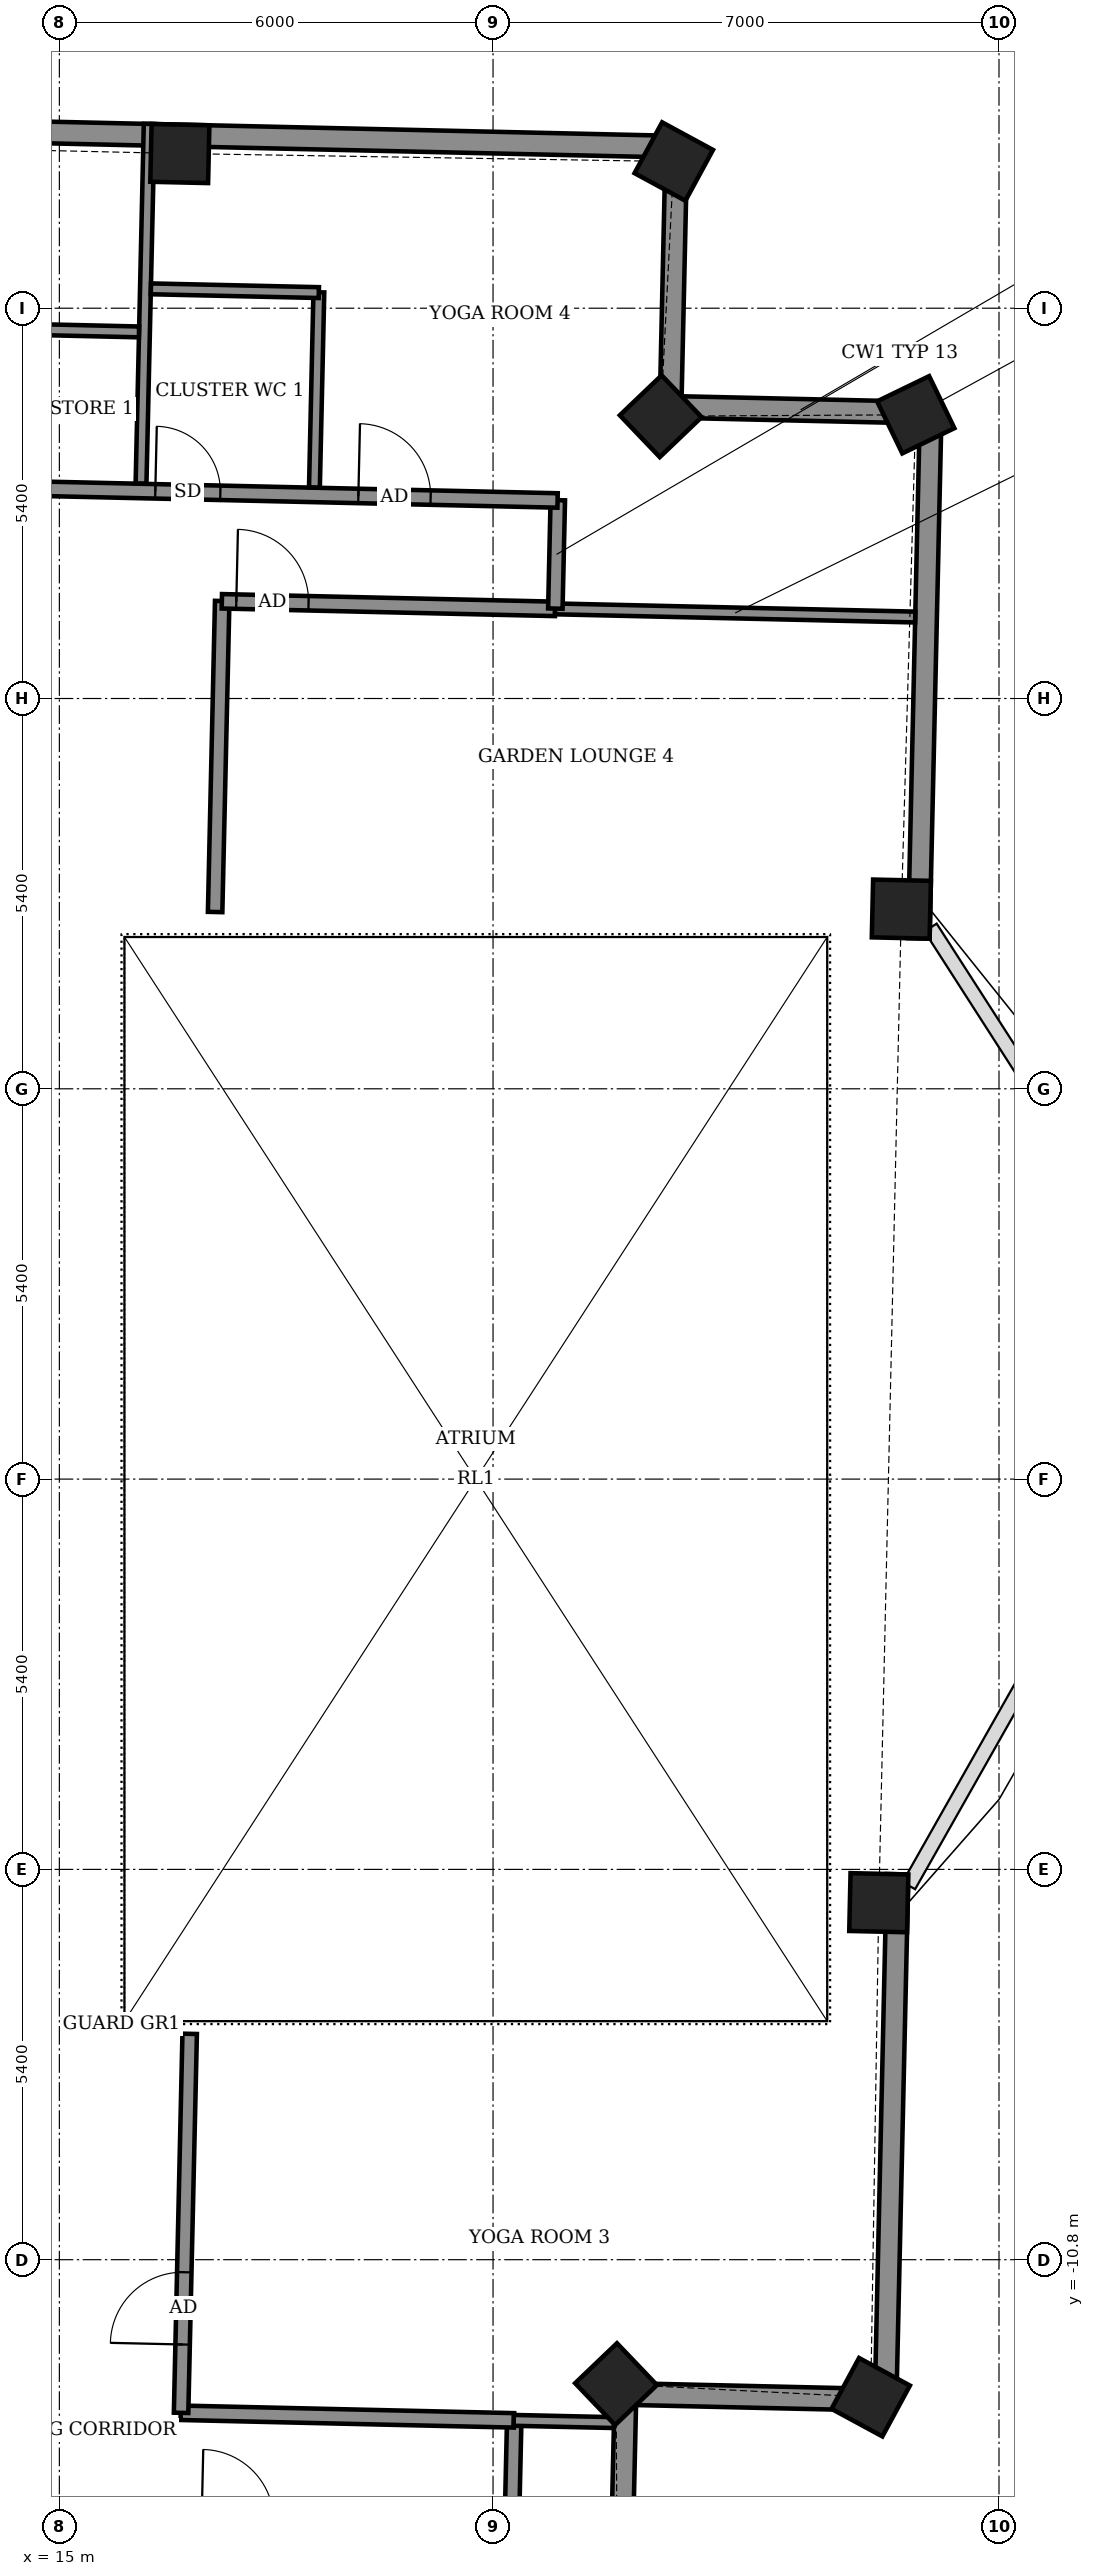
"""IFC4 building model, lengths in metres.
Left out: names, types, materials, properties, quantities, classifications, styles, units other than length and angle.
Written with IfcOpenShell. Run it as: python <this file> out.ifc"""

import sys

from ifc_helpers import new_model, si_unit, direction, frame, frame_2d, origin, origin_2d, place, context, subcontext, project, spatial, rectangle, extrude, element, fill, save


model = new_model("IFC4")
c1 = context("Model", 3, precision=1e-05, world=origin(), true_north=direction((0.0, 1.0)))
c2 = subcontext(c1, "Body", "Model", "MODEL_VIEW")
j1 = project(units=[si_unit("LENGTHUNIT", "METRE"), si_unit("PLANEANGLEUNIT", "RADIAN")], contexts=[c1])
p1 = place(None, origin())
s1 = spatial("IfcSite", under=j1, at=p1, CompositionType="ELEMENT")
p2 = place(p1, origin())
s2 = spatial("IfcBuilding", under=s1, at=p2, CompositionType="ELEMENT")
p3 = place(p2, frame((0.0, 0.0, 350.7)))
s3 = spatial("IfcBuildingStorey", under=s2, at=p3, CompositionType="ELEMENT", Elevation=350.7)
for number, where, z_axis, x_axis in (
    (1, (22.702, -12.522, -0.55), (0.0, 0.0, 1.0), (0.723, 0.691, 0.0)),
    (2, (26.225, -12.702, -0.55), (0.0, 0.0, 1.0), (0.476, 0.879, 0.0)),
    (3, (26.337, -5.861, -0.55), (0.0, 0.0, 1.0), (0.023, 1.0, 0.0)),
    (4, (26.649, 7.886, -0.55), (0.0, 0.0, 1.0), (0.023, 1.0, 0.0)),
    (5, (26.848, 14.726, -0.55), (0.0, 0.0, 1.0), (-0.436, 0.9, 0.0)),
    (6, (23.32, 14.706, -0.55), (0.0, 0.0, 1.0), (-0.691, 0.723, 0.0)),
    (7, (23.5, 18.229, -0.55), (0.0, 0.0, 1.0), (-0.879, 0.477, 0.0)),
    (8, (16.667, 18.34, -0.55), (0.0, 0.0, 1.0), (-1.0, 0.023, 0.0)),
):
    element("IfcColumn", number, at=place(p3, frame(where, z_axis=z_axis, x_axis=x_axis)), inside=s3, PredefinedType="COLUMN", context=c2, shape_type="SweptSolid", body=[
        extrude(rectangle(XDim=0.8, YDim=0.8, at=origin_2d()), origin(), (0.0, 0.0, 1.0), 3.6),
    ])
p4 = place(p3, frame((26.431, -12.74, 0.0), z_axis=(0.0, 0.0, 1.0), x_axis=(0.022686338341, 0.999742631907, 0.0)))
e9 = element("IfcWall", 9, at=p4, inside=s3, PredefinedType="SOLIDWALL", context=c2, shape_type="SweptSolid", body=[
    extrude(rectangle(XDim=7.275, YDim=0.3, at=frame_2d((3.637, 0.0))), origin(), (0.0, 0.0, 1.0), 2.55),
])
p5 = place(p3, frame((26.89, 7.481, 0.0), z_axis=(0.0, 0.0, 1.0), x_axis=(0.02268938335, 0.999742562805, 0.0)))
e10 = element("IfcWall", 10, at=p5, inside=s3, PredefinedType="SOLIDWALL", context=c2, shape_type="SweptSolid", body=[
    extrude(rectangle(XDim=7.274, YDim=0.3, at=frame_2d((3.637, 0.0))), origin(), (0.0, 0.0, 1.0), 2.55),
])
p6 = place(p3, frame((27.055, 14.753, 0.0), z_axis=(0.0, 0.0, 1.0), x_axis=(-0.999740327787, 0.022787650101, 0.0)))
e11 = element("IfcWall", 11, at=p6, inside=s3, PredefinedType="SOLIDWALL", context=c2, shape_type="SweptSolid", body=[
    extrude(rectangle(XDim=3.6, YDim=0.3, at=frame_2d((1.8, 0.0))), origin(), (0.0, 0.0, 1.0), 2.55),
])
p7 = place(p3, frame((23.456, 14.835, 0.0), z_axis=(0.0, 0.0, 1.0), x_axis=(0.022514980321, 0.999746505701, 0.0)))
e12 = element("IfcWall", 12, at=p7, inside=s3, PredefinedType="SOLIDWALL", context=c2, shape_type="SweptSolid", body=[
    extrude(rectangle(XDim=3.6, YDim=0.3, at=frame_2d((1.8, 0.0))), origin(), (0.0, 0.0, 1.0), 2.55),
])
p8 = place(p3, frame((23.537, 18.434, 0.0), z_axis=(0.0, 0.0, 1.0), x_axis=(-0.999742787513, 0.022679480066, 0.0)))
e13 = element("IfcWall", 13, at=p8, inside=s3, PredefinedType="SOLIDWALL", context=c2, shape_type="SweptSolid", body=[
    extrude(rectangle(XDim=41.8, YDim=0.3, at=frame_2d((20.9, 0.0))), origin(), (0.0, 0.0, 1.0), 2.5),
])
p9 = place(p3, frame((22.75, -16.257, 0.0), z_axis=(0.0, 0.0, 1.0), x_axis=(0.02278610514, 0.999740363001, 0.0)))
e14 = element("IfcWall", 14, at=p9, inside=s3, PredefinedType="SOLIDWALL", context=c2, shape_type="SweptSolid", body=[
    extrude(rectangle(XDim=3.6, YDim=0.3, at=frame_2d((1.8, 0.0))), origin(), (0.0, 0.0, 1.0), 2.55),
])
p10 = place(p3, frame((22.832, -12.658, 0.0), z_axis=(0.0, 0.0, 1.0), x_axis=(0.999740327787, -0.022787650101, 0.0)))
e15 = element("IfcWall", 15, at=p10, inside=s3, PredefinedType="SOLIDWALL", context=c2, shape_type="SweptSolid", body=[
    extrude(rectangle(XDim=3.6, YDim=0.3, at=frame_2d((1.8, 0.0))), origin(), (0.0, 0.0, 1.0), 2.55),
])
p11 = place(p3, frame((-17.468, -13.644, 0.0), z_axis=(0.0, 0.0, 1.0), x_axis=(0.999742531431, -0.022690765715, 0.0)))
e16 = element("IfcWall", 16, at=p11, inside=s3, PredefinedType="PARTITIONING", context=c2, shape_type="SweptSolid", body=[
    extrude(rectangle(XDim=38.734, YDim=0.2, at=frame_2d((19.367, 0.0))), origin(), (0.0, 0.0, 1.0), 3.05),
])
p12 = place(p11, frame((1.154, 0.0, 0.0)))
e17 = element("IfcOpeningElement", 17, at=p12, cuts=e16, PredefinedType="OPENING", context=c2, shape_type="SweptSolid", body=[
    extrude(rectangle(XDim=1.0, YDim=2.1, at=frame_2d((0.5, 1.05))), frame((0.0, 0.11, 0.0), z_axis=(0.0, -1.0, 0.0), x_axis=(1.0, 0.0, 0.0)), (0.0, 0.0, 1.0), 0.22),
])
p13 = place(p11, frame((8.367, 0.0, 0.0)))
e18 = element("IfcOpeningElement", 18, at=p13, cuts=e16, PredefinedType="OPENING", context=c2, shape_type="SweptSolid", body=[
    extrude(rectangle(XDim=1.0, YDim=2.1, at=frame_2d((0.5, 1.05))), frame((0.0, 0.11, 0.0), z_axis=(0.0, -1.0, 0.0), x_axis=(1.0, 0.0, 0.0)), (0.0, 0.0, 1.0), 0.22),
])
p14 = place(p11, frame((16.117, 0.0, 0.0)))
e19 = element("IfcOpeningElement", 19, at=p14, cuts=e16, PredefinedType="OPENING", context=c2, shape_type="SweptSolid", body=[
    extrude(rectangle(XDim=1.0, YDim=2.1, at=frame_2d((0.5, 1.05))), frame((0.0, 0.11, 0.0), z_axis=(0.0, -1.0, 0.0), x_axis=(1.0, 0.0, 0.0)), (0.0, 0.0, 1.0), 0.22),
])
p15 = place(p11, frame((21.367, 0.0, 0.0)))
e20 = element("IfcOpeningElement", 20, at=p15, cuts=e16, PredefinedType="OPENING", context=c2, shape_type="SweptSolid", body=[
    extrude(rectangle(XDim=0.9, YDim=2.1, at=frame_2d((0.45, 1.05))), frame((0.0, 0.11, 0.0), z_axis=(0.0, -1.0, 0.0), x_axis=(1.0, 0.0, 0.0)), (0.0, 0.0, 1.0), 0.22),
])
p16 = place(p11, frame((27.403, 0.0, 0.0)))
e21 = element("IfcOpeningElement", 21, at=p16, cuts=e16, PredefinedType="OPENING", context=c2, shape_type="SweptSolid", body=[
    extrude(rectangle(XDim=1.0, YDim=2.1, at=frame_2d((0.5, 1.05))), frame((0.0, 0.11, 0.0), z_axis=(0.0, -1.0, 0.0), x_axis=(1.0, 0.0, 0.0)), (0.0, 0.0, 1.0), 0.22),
])
p17 = place(p11, frame((23.967, 0.0, 0.0)))
e22 = element("IfcOpeningElement", 22, at=p17, cuts=e16, PredefinedType="OPENING", context=c2, shape_type="SweptSolid", body=[
    extrude(rectangle(XDim=0.9, YDim=2.1, at=frame_2d((0.45, 1.05))), frame((0.0, 0.11, 0.0), z_axis=(0.0, -1.0, 0.0), x_axis=(1.0, 0.0, 0.0)), (0.0, 0.0, 1.0), 0.22),
])
p18 = place(p11, frame((34.445, 0.0, 0.0)))
e23 = element("IfcOpeningElement", 23, at=p18, cuts=e16, PredefinedType="OPENING", context=c2, shape_type="SweptSolid", body=[
    extrude(rectangle(XDim=1.0, YDim=2.1, at=frame_2d((0.5, 1.05))), frame((0.0, 0.11, 0.0), z_axis=(0.0, -1.0, 0.0), x_axis=(1.0, 0.0, 0.0)), (0.0, 0.0, 1.0), 0.22),
])
p19 = place(p3, frame((21.259, -14.523, 0.0), z_axis=(0.0, 0.0, 1.0), x_axis=(0.022617910375, 0.999744182344, 0.0)))
e24 = element("IfcWall", 24, at=p19, inside=s3, PredefinedType="PARTITIONING", context=c2, shape_type="SweptSolid", body=[
    extrude(rectangle(XDim=1.5, YDim=0.2, at=frame_2d((0.75, 0.0))), origin(), (0.0, 0.0, 1.0), 3.05),
])
p20 = place(p3, frame((16.679, -12.918, 0.0), z_axis=(0.0, 0.0, 1.0), x_axis=(0.99974093296, -0.022761084406, 0.0)))
e25 = element("IfcWall", 25, at=p20, inside=s3, PredefinedType="PARTITIONING", context=c2, shape_type="SweptSolid", body=[
    extrude(rectangle(XDim=4.612, YDim=0.2, at=frame_2d((2.306, 0.0))), origin(), (0.0, 0.0, 1.0), 3.05),
])
p21 = place(p3, frame((16.684, -12.919, 0.0), z_axis=(0.0, 0.0, 1.0), x_axis=(0.022667483124, 0.999743059595, 0.0)))
e26 = element("IfcWall", 26, at=p21, inside=s3, PredefinedType="PARTITIONING", context=c2, shape_type="SweptSolid", body=[
    extrude(rectangle(XDim=5.245, YDim=0.2, at=frame_2d((2.623, 0.0))), origin(), (0.0, 0.0, 1.0), 3.05),
])
p22 = place(p21, frame((0.946, 0.0, 0.0)))
e27 = element("IfcOpeningElement", 27, at=p22, cuts=e26, PredefinedType="OPENING", context=c2, shape_type="SweptSolid", body=[
    extrude(rectangle(XDim=1.0, YDim=2.1, at=frame_2d((0.5, 1.05))), frame((0.0, 0.11, 0.0), z_axis=(0.0, -1.0, 0.0), x_axis=(1.0, 0.0, 0.0)), (0.0, 0.0, 1.0), 0.22),
])
p23 = place(p3, frame((21.286, -13.023, 0.0), z_axis=(0.0, 0.0, 1.0), x_axis=(0.999750303588, -0.022345703723, 0.0)))
e28 = element("IfcWall", 28, at=p23, inside=s3, PredefinedType="PARTITIONING", context=c2, shape_type="SweptSolid", body=[
    extrude(rectangle(XDim=1.387, YDim=0.15, at=frame_2d((0.694, 0.0))), origin(), (0.0, 0.0, 1.0), 2.55),
])
p24 = place(p3, frame((17.155, 7.846, 0.0), z_axis=(0.0, 0.0, 1.0), x_axis=(0.022745886685, 0.999741278851, 0.0)))
e29 = element("IfcWall", 29, at=p24, inside=s3, PredefinedType="PARTITIONING", context=c2, shape_type="SweptSolid", body=[
    extrude(rectangle(XDim=4.304, YDim=0.2, at=frame_2d((2.152, 0.0))), origin(), (0.0, 0.0, 1.0), 3.05),
])
p25 = place(p3, frame((17.248, 12.145, 0.0), z_axis=(0.0, 0.0, 1.0), x_axis=(0.999740905536, -0.022762288964, 0.0)))
e30 = element("IfcWall", 30, at=p25, inside=s3, PredefinedType="PARTITIONING", context=c2, shape_type="SweptSolid", body=[
    extrude(rectangle(XDim=4.612, YDim=0.2, at=frame_2d((2.306, 0.0))), origin(), (0.0, 0.0, 1.0), 3.05),
])
p26 = place(p25, frame((0.2, 0.0, 0.0)))
e31 = element("IfcOpeningElement", 31, at=p26, cuts=e30, PredefinedType="OPENING", context=c2, shape_type="SweptSolid", body=[
    extrude(rectangle(XDim=1.0, YDim=2.1, at=frame_2d((0.5, 1.05))), frame((0.0, 0.11, 0.0), z_axis=(0.0, -1.0, 0.0), x_axis=(1.0, 0.0, 0.0)), (0.0, 0.0, 1.0), 0.22),
])
p27 = place(p3, frame((21.859, 12.04, 0.0), z_axis=(0.0, 0.0, 1.0), x_axis=(0.999742719999, -0.022682455989, 0.0)))
e32 = element("IfcWall", 32, at=p27, inside=s3, PredefinedType="PARTITIONING", context=c2, shape_type="SweptSolid", body=[
    extrude(rectangle(XDim=4.983, YDim=0.15, at=frame_2d((2.492, 0.0))), origin(), (0.0, 0.0, 1.0), 2.55),
])
p28 = place(p3, frame((21.862, 12.044, 0.0), z_axis=(0.0, 0.0, 1.0), x_axis=(0.022617910375, 0.999744182344, 0.0)))
e33 = element("IfcWall", 33, at=p28, inside=s3, PredefinedType="PARTITIONING", context=c2, shape_type="SweptSolid", body=[
    extrude(rectangle(XDim=1.5, YDim=0.2, at=frame_2d((0.75, 0.0))), origin(), (0.0, 0.0, 1.0), 3.05),
])
p29 = place(p3, frame((-16.831, 14.419, 0.0), z_axis=(0.0, 0.0, 1.0), x_axis=(0.999742531431, -0.022690765715, 0.0)))
e34 = element("IfcWall", 34, at=p29, inside=s3, PredefinedType="PARTITIONING", context=c2, shape_type="SweptSolid", body=[
    extrude(rectangle(XDim=38.734, YDim=0.2, at=frame_2d((19.367, 0.0))), origin(), (0.0, 0.0, 1.0), 3.05),
])
p30 = place(p29, frame((35.977, 0.0, 0.0)))
e35 = element("IfcOpeningElement", 35, at=p30, cuts=e34, PredefinedType="OPENING", context=c2, shape_type="SweptSolid", body=[
    extrude(rectangle(XDim=1.0, YDim=2.1, at=frame_2d((0.5, 1.05))), frame((0.0, 0.11, 0.0), z_axis=(0.0, -1.0, 0.0), x_axis=(1.0, 0.0, 0.0)), (0.0, 0.0, 1.0), 0.22),
])
p31 = place(p29, frame((33.167, 0.0, 0.0)))
e36 = element("IfcOpeningElement", 36, at=p31, cuts=e34, PredefinedType="OPENING", context=c2, shape_type="SweptSolid", body=[
    extrude(rectangle(XDim=0.9, YDim=2.1, at=frame_2d((0.45, 1.05))), frame((0.0, 0.11, 0.0), z_axis=(0.0, -1.0, 0.0), x_axis=(1.0, 0.0, 0.0)), (0.0, 0.0, 1.0), 0.22),
])
p32 = place(p29, frame((28.467, 0.0, 0.0)))
e37 = element("IfcOpeningElement", 37, at=p32, cuts=e34, PredefinedType="OPENING", context=c2, shape_type="SweptSolid", body=[
    extrude(rectangle(XDim=1.0, YDim=2.1, at=frame_2d((0.5, 1.05))), frame((0.0, 0.11, 0.0), z_axis=(0.0, -1.0, 0.0), x_axis=(1.0, 0.0, 0.0)), (0.0, 0.0, 1.0), 0.22),
])
p33 = place(p29, frame((30.767, 0.0, 0.0)))
e38 = element("IfcOpeningElement", 38, at=p33, cuts=e34, PredefinedType="OPENING", context=c2, shape_type="SweptSolid", body=[
    extrude(rectangle(XDim=0.9, YDim=2.1, at=frame_2d((0.45, 1.05))), frame((0.0, 0.11, 0.0), z_axis=(0.0, -1.0, 0.0), x_axis=(1.0, 0.0, 0.0)), (0.0, 0.0, 1.0), 0.22),
])
p34 = place(p29, frame((23.541, 0.0, 0.0)))
e39 = element("IfcOpeningElement", 39, at=p34, cuts=e34, PredefinedType="OPENING", context=c2, shape_type="SweptSolid", body=[
    extrude(rectangle(XDim=1.0, YDim=2.1, at=frame_2d((0.5, 1.05))), frame((0.0, 0.11, 0.0), z_axis=(0.0, -1.0, 0.0), x_axis=(1.0, 0.0, 0.0)), (0.0, 0.0, 1.0), 0.22),
])
p35 = place(p29, frame((15.828, 0.0, 0.0)))
e40 = element("IfcOpeningElement", 40, at=p35, cuts=e34, PredefinedType="OPENING", context=c2, shape_type="SweptSolid", body=[
    extrude(rectangle(XDim=1.0, YDim=2.1, at=frame_2d((0.5, 1.05))), frame((0.0, 0.11, 0.0), z_axis=(0.0, -1.0, 0.0), x_axis=(1.0, 0.0, 0.0)), (0.0, 0.0, 1.0), 0.22),
])
p36 = place(p29, frame((19.967, 0.0, 0.0)))
e41 = element("IfcOpeningElement", 41, at=p36, cuts=e34, PredefinedType="OPENING", context=c2, shape_type="SweptSolid", body=[
    extrude(rectangle(XDim=0.9, YDim=2.1, at=frame_2d((0.45, 1.05))), frame((0.0, 0.11, 0.0), z_axis=(0.0, -1.0, 0.0), x_axis=(1.0, 0.0, 0.0)), (0.0, 0.0, 1.0), 0.22),
])
p37 = place(p29, frame((9.83, 0.0, 0.0)))
e42 = element("IfcOpeningElement", 42, at=p37, cuts=e34, PredefinedType="OPENING", context=c2, shape_type="SweptSolid", body=[
    extrude(rectangle(XDim=1.0, YDim=2.1, at=frame_2d((0.5, 1.05))), frame((0.0, 0.11, 0.0), z_axis=(0.0, -1.0, 0.0), x_axis=(1.0, 0.0, 0.0)), (0.0, 0.0, 1.0), 0.22),
])
p38 = place(p29, frame((6.817, 0.0, 0.0)))
e43 = element("IfcOpeningElement", 43, at=p38, cuts=e34, PredefinedType="OPENING", context=c2, shape_type="SweptSolid", body=[
    extrude(rectangle(XDim=0.9, YDim=2.1, at=frame_2d((0.45, 1.05))), frame((0.0, 0.11, 0.0), z_axis=(0.0, -1.0, 0.0), x_axis=(1.0, 0.0, 0.0)), (0.0, 0.0, 1.0), 0.22),
])
p39 = place(p29, frame((0.2, 0.0, 0.0)))
e44 = element("IfcOpeningElement", 44, at=p39, cuts=e34, PredefinedType="OPENING", context=c2, shape_type="SweptSolid", body=[
    extrude(rectangle(XDim=1.0, YDim=2.1, at=frame_2d((0.5, 1.05))), frame((0.0, 0.11, 0.0), z_axis=(0.0, -1.0, 0.0), x_axis=(1.0, 0.0, 0.0)), (0.0, 0.0, 1.0), 0.22),
])
p40 = place(p29, frame((4.217, 0.0, 0.0)))
e45 = element("IfcOpeningElement", 45, at=p40, cuts=e34, PredefinedType="OPENING", context=c2, shape_type="SweptSolid", body=[
    extrude(rectangle(XDim=0.9, YDim=2.1, at=frame_2d((0.45, 1.05))), frame((0.0, 0.11, 0.0), z_axis=(0.0, -1.0, 0.0), x_axis=(1.0, 0.0, 0.0)), (0.0, 0.0, 1.0), 0.22),
])
p41 = place(p3, frame((16.13, 13.775, 0.0), z_axis=(0.0, 0.0, 1.0), x_axis=(0.022714718825, 0.999741987489, 0.0)))
e46 = element("IfcWall", 46, at=p41, inside=s3, PredefinedType="PARTITIONING", context=c2, shape_type="SweptSolid", body=[
    extrude(rectangle(XDim=4.976, YDim=0.15, at=frame_2d((2.488, 0.0))), origin(), (0.0, 0.0, 1.0), 2.5),
])
p42 = place(p3, frame((18.529, 13.72, 0.0), z_axis=(0.0, 0.0, 1.0), x_axis=(0.022600248254, 0.99974458177, 0.0)))
e47 = element("IfcWall", 47, at=p42, inside=s3, PredefinedType="PARTITIONING", context=c2, shape_type="SweptSolid", body=[
    extrude(rectangle(XDim=2.701, YDim=0.15, at=frame_2d((1.35, 0.0))), origin(), (0.0, 0.0, 1.0), 3.05),
])
for number, where, z_axis, x_axis in (
    (48, (13.778, 15.925, 0.0), (0.0, 0.0, 1.0), (1.0, -0.023, 0.0)),
    (49, (16.266, 16.468, 0.0), (0.0, 0.0, 1.0), (1.0, -0.022, 0.0)),
):
    element("IfcWall", number, at=place(p3, frame(where, z_axis=z_axis, x_axis=x_axis)), inside=s3, PredefinedType="PARTITIONING", context=c2, shape_type="SweptSolid", body=[
        extrude(rectangle(XDim=2.324, YDim=0.15, at=frame_2d((1.162, 0.0))), origin(), (0.0, 0.0, 1.0), 3.05),
    ])
p43 = place(p2, frame((0.0, 0.0, 354.3)))
p44 = place(p43, frame((0.0, 0.0, -0.55)))
p45 = place(p44, frame((20.762, 0.0, 0.0)))
p46 = place(p45, frame((0.0, 0.0, 0.5)))
e50 = element("IfcWindow", 50, at=p46, inside=s3, PartitioningType="SINGLE_PANEL", PredefinedType="SKYLIGHT", context=c2, shape_type="SweptSolid", body=[
    extrude(rectangle(XDim=9.723, YDim=15.0, at=origin_2d()), origin(), (0.0, 0.0, 1.0), 0.05),
])
p47 = place(p22, origin())
e51 = element("IfcDoor", 51, at=p47, inside=s3, OperationType="SINGLE_SWING_RIGHT", PredefinedType="DOOR", context=c2, shape_type="SweptSolid", body=[
    extrude(rectangle(XDim=1.0, YDim=2.1, at=frame_2d((0.5, 1.05))), frame((0.0, 0.025, 0.0), z_axis=(0.0, -1.0, 0.0), x_axis=(1.0, 0.0, 0.0)), (0.0, 0.0, 1.0), 0.05),
])
fill(e27, e51)
p48 = place(p26, origin())
e52 = element("IfcDoor", 52, at=p48, inside=s3, OperationType="SINGLE_SWING_LEFT", PredefinedType="DOOR", context=c2, shape_type="SweptSolid", body=[
    extrude(rectangle(XDim=1.0, YDim=2.1, at=frame_2d((0.5, 1.05))), frame((0.0, 0.025, 0.0), z_axis=(0.0, -1.0, 0.0), x_axis=(1.0, 0.0, 0.0)), (0.0, 0.0, 1.0), 0.05),
])
fill(e31, e52)
p49 = place(p30, origin())
e53 = element("IfcDoor", 53, at=p49, inside=s3, OperationType="SINGLE_SWING_RIGHT", PredefinedType="DOOR", context=c2, shape_type="SweptSolid", body=[
    extrude(rectangle(XDim=1.0, YDim=2.1, at=frame_2d((0.5, 1.05))), frame((0.0, 0.025, 0.0), z_axis=(0.0, -1.0, 0.0), x_axis=(1.0, 0.0, 0.0)), (0.0, 0.0, 1.0), 0.05),
])
fill(e35, e53)
p50 = place(p31, origin())
e54 = element("IfcDoor", 54, at=p50, inside=s3, OperationType="SINGLE_SWING_LEFT", PredefinedType="DOOR", context=c2, shape_type="SweptSolid", body=[
    extrude(rectangle(XDim=0.9, YDim=2.1, at=frame_2d((0.45, 1.05))), frame((0.0, 0.025, 0.0), z_axis=(0.0, -1.0, 0.0), x_axis=(1.0, 0.0, 0.0)), (0.0, 0.0, 1.0), 0.05),
])
fill(e36, e54)
save(model, sys.argv[1])
